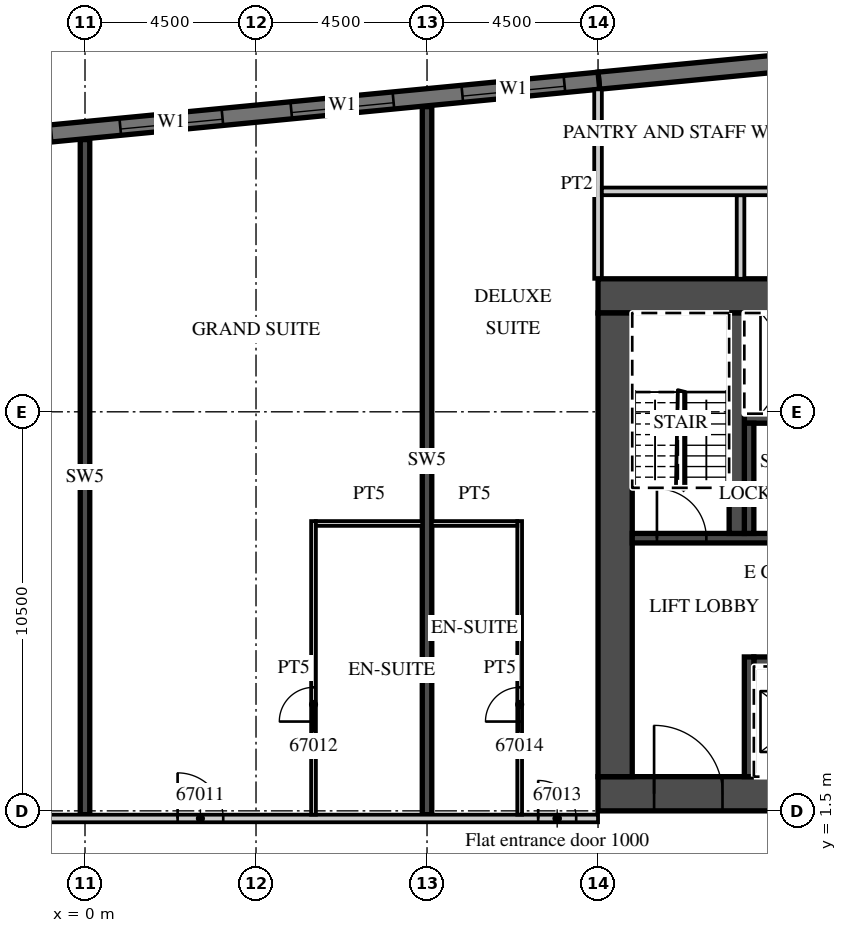
"""IFC4 building model, lengths in metres.
Left out: names, types, materials, properties, quantities, classifications, styles, units other than length and angle.
Written with IfcOpenShell. Run it as: python <this file> out.ifc"""

import sys

from ifc_helpers import new_model, si_unit, direction, frame, frame_2d, origin, place, context, subcontext, project, spatial, rectangle, extrude, element, fill, save


model = new_model("IFC4")
c1 = context("Model", 3, precision=1e-05, world=origin(), true_north=direction((0.0, 1.0)))
c2 = subcontext(c1, "Body", "Model", "MODEL_VIEW")
j1 = project(units=[si_unit("LENGTHUNIT", "METRE"), si_unit("PLANEANGLEUNIT", "RADIAN")], contexts=[c1])
p1 = place(None, origin())
s1 = spatial("IfcSite", under=j1, at=p1, CompositionType="ELEMENT")
p2 = place(p1, origin())
s2 = spatial("IfcBuilding", under=s1, at=p2, CompositionType="ELEMENT")
p3 = place(p2, frame((0.0, 0.0, 271.8)))
s3 = spatial("IfcBuildingStorey", under=s2, at=p3, CompositionType="ELEMENT", Elevation=271.8)
p4 = place(p3, frame((0.0, 1.4, 0.0), z_axis=(0.0, 0.0, 1.0), x_axis=(0.0, 1.0, 0.0)))
e1 = element("IfcWall", 1, at=p4, inside=s3, PredefinedType="SHEAR", context=c2, shape_type="SweptSolid", body=[
    extrude(rectangle(XDim=17.763, YDim=0.25, at=frame_2d((8.881, 0.0))), origin(), (0.0, 0.0, 1.0), 3.3),
])
p5 = place(p3, frame((9.0, 1.4, 0.0), z_axis=(0.0, 0.0, 1.0), x_axis=(0.0, 1.0, 0.0)))
e2 = element("IfcWall", 2, at=p5, inside=s3, PredefinedType="SHEAR", context=c2, shape_type="SweptSolid", body=[
    extrude(rectangle(XDim=18.629, YDim=0.25, at=frame_2d((9.315, 0.0))), origin(), (0.0, 0.0, 1.0), 3.3),
])
p6 = place(p3, frame((30.946, 22.391, 0.0), z_axis=(0.0, 0.0, 1.0), x_axis=(-0.995396397117, -0.095843688398, 0.0)))
e3 = element("IfcWall", 3, at=p6, inside=s3, PredefinedType="SOLIDWALL", context=c2, shape_type="SweptSolid", body=[
    extrude(rectangle(XDim=17.505, YDim=0.45, at=frame_2d((8.752, 0.0))), origin(), (0.0, 0.0, 1.0), 3.02),
])
p7 = place(p3, frame((13.521, 20.713, 0.0), z_axis=(0.0, 0.0, 1.0), x_axis=(-0.995396277313, -0.095844932638, 0.0)))
e4 = element("IfcWall", 4, at=p7, inside=s3, PredefinedType="SOLIDWALL", context=c2, shape_type="SweptSolid", body=[
    extrude(rectangle(XDim=51.495, YDim=0.45, at=frame_2d((25.748, 0.0))), origin(), (0.0, 0.0, 1.0), 3.02),
])
p8 = place(p7, frame((0.91, 0.0, 0.45)))
e5 = element("IfcOpeningElement", 5, at=p8, cuts=e4, PredefinedType="OPENING", context=c2, shape_type="SweptSolid", body=[
    extrude(rectangle(XDim=2.7, YDim=2.25, at=frame_2d((1.35, 1.125))), frame((0.0, 0.235, 0.0), z_axis=(0.0, -1.0, 0.0), x_axis=(1.0, 0.0, 0.0)), (0.0, 0.0, 1.0), 0.47),
])
p9 = place(p7, frame((5.431, 0.0, 0.45)))
e6 = element("IfcOpeningElement", 6, at=p9, cuts=e4, PredefinedType="OPENING", context=c2, shape_type="SweptSolid", body=[
    extrude(rectangle(XDim=2.7, YDim=2.25, at=frame_2d((1.35, 1.125))), frame((0.0, 0.235, 0.0), z_axis=(0.0, -1.0, 0.0), x_axis=(1.0, 0.0, 0.0)), (0.0, 0.0, 1.0), 0.47),
])
p10 = place(p7, frame((9.952, 0.0, 0.45)))
e7 = element("IfcOpeningElement", 7, at=p10, cuts=e4, PredefinedType="OPENING", context=c2, shape_type="SweptSolid", body=[
    extrude(rectangle(XDim=2.7, YDim=2.25, at=frame_2d((1.35, 1.125))), frame((0.0, 0.235, 0.0), z_axis=(0.0, -1.0, 0.0), x_axis=(1.0, 0.0, 0.0)), (0.0, 0.0, 1.0), 0.47),
])
p11 = place(p7, frame((14.473, 0.0, 0.45)))
e8 = element("IfcOpeningElement", 8, at=p11, cuts=e4, PredefinedType="OPENING", context=c2, shape_type="SweptSolid", body=[
    extrude(rectangle(XDim=2.7, YDim=2.25, at=frame_2d((1.35, 1.125))), frame((0.0, 0.235, 0.0), z_axis=(0.0, -1.0, 0.0), x_axis=(1.0, 0.0, 0.0)), (0.0, 0.0, 1.0), 0.47),
])
p12 = place(p7, frame((18.994, 0.0, 0.45)))
e9 = element("IfcOpeningElement", 9, at=p12, cuts=e4, PredefinedType="OPENING", context=c2, shape_type="SweptSolid", body=[
    extrude(rectangle(XDim=2.7, YDim=2.25, at=frame_2d((1.35, 1.125))), frame((0.0, 0.235, 0.0), z_axis=(0.0, -1.0, 0.0), x_axis=(1.0, 0.0, 0.0)), (0.0, 0.0, 1.0), 0.47),
])
p13 = place(p7, frame((23.514, 0.0, 0.45)))
e10 = element("IfcOpeningElement", 10, at=p13, cuts=e4, PredefinedType="OPENING", context=c2, shape_type="SweptSolid", body=[
    extrude(rectangle(XDim=2.7, YDim=2.25, at=frame_2d((1.35, 1.125))), frame((0.0, 0.235, 0.0), z_axis=(0.0, -1.0, 0.0), x_axis=(1.0, 0.0, 0.0)), (0.0, 0.0, 1.0), 0.47),
])
p14 = place(p7, frame((28.035, 0.0, 0.45)))
e11 = element("IfcOpeningElement", 11, at=p14, cuts=e4, PredefinedType="OPENING", context=c2, shape_type="SweptSolid", body=[
    extrude(rectangle(XDim=2.7, YDim=2.25, at=frame_2d((1.35, 1.125))), frame((0.0, 0.235, 0.0), z_axis=(0.0, -1.0, 0.0), x_axis=(1.0, 0.0, 0.0)), (0.0, 0.0, 1.0), 0.47),
])
p15 = place(p7, frame((32.556, 0.0, 0.45)))
e12 = element("IfcOpeningElement", 12, at=p15, cuts=e4, PredefinedType="OPENING", context=c2, shape_type="SweptSolid", body=[
    extrude(rectangle(XDim=2.7, YDim=2.25, at=frame_2d((1.35, 1.125))), frame((0.0, 0.235, 0.0), z_axis=(0.0, -1.0, 0.0), x_axis=(1.0, 0.0, 0.0)), (0.0, 0.0, 1.0), 0.47),
])
p16 = place(p7, frame((37.077, 0.0, 0.45)))
e13 = element("IfcOpeningElement", 13, at=p16, cuts=e4, PredefinedType="OPENING", context=c2, shape_type="SweptSolid", body=[
    extrude(rectangle(XDim=2.7, YDim=2.25, at=frame_2d((1.35, 1.125))), frame((0.0, 0.235, 0.0), z_axis=(0.0, -1.0, 0.0), x_axis=(1.0, 0.0, 0.0)), (0.0, 0.0, 1.0), 0.47),
])
p17 = place(p7, frame((41.598, 0.0, 0.45)))
e14 = element("IfcOpeningElement", 14, at=p17, cuts=e4, PredefinedType="OPENING", context=c2, shape_type="SweptSolid", body=[
    extrude(rectangle(XDim=2.7, YDim=2.25, at=frame_2d((1.35, 1.125))), frame((0.0, 0.235, 0.0), z_axis=(0.0, -1.0, 0.0), x_axis=(1.0, 0.0, 0.0)), (0.0, 0.0, 1.0), 0.47),
])
p18 = place(p7, frame((46.118, 0.0, 0.45)))
e15 = element("IfcOpeningElement", 15, at=p18, cuts=e4, PredefinedType="OPENING", context=c2, shape_type="SweptSolid", body=[
    extrude(rectangle(XDim=2.7, YDim=2.25, at=frame_2d((1.35, 1.125))), frame((0.0, 0.235, 0.0), z_axis=(0.0, -1.0, 0.0), x_axis=(1.0, 0.0, 0.0)), (0.0, 0.0, 1.0), 0.47),
])
p19 = place(p3, frame((13.5, 15.5, 0.0), z_axis=(0.0, 0.0, 1.0), x_axis=(0.0, 1.0, 0.0)))
e16 = element("IfcWall", 16, at=p19, inside=s3, PredefinedType="PARTITIONING", context=c2, shape_type="SweptSolid", body=[
    extrude(rectangle(XDim=4.985, YDim=0.2, at=frame_2d((2.493, 0.0))), origin(), (0.0, 0.0, 1.0), 3.02),
])
p20 = place(p3, frame((-39.909, 1.3, 0.0), z_axis=(0.0, 0.0, 1.0), x_axis=(1.0, 0.0, 0.0)))
e17 = element("IfcWall", 17, at=p20, inside=s3, PredefinedType="PARTITIONING", context=c2, shape_type="SweptSolid", body=[
    extrude(rectangle(XDim=53.409, YDim=0.2, at=frame_2d((26.705, 0.0))), origin(), (0.0, 0.0, 1.0), 3.02),
])
p21 = place(p20, frame((0.15, 0.0, 0.0)))
e18 = element("IfcOpeningElement", 18, at=p21, cuts=e17, PredefinedType="OPENING", context=c2, shape_type="SweptSolid", body=[
    extrude(rectangle(XDim=0.9, YDim=2.1, at=frame_2d((0.45, 1.05))), frame((0.0, 0.11, 0.0), z_axis=(0.0, -1.0, 0.0), x_axis=(1.0, 0.0, 0.0)), (0.0, 0.0, 1.0), 0.22),
])
p22 = place(p20, frame((9.271, 0.0, 0.0)))
e19 = element("IfcOpeningElement", 19, at=p22, cuts=e17, PredefinedType="OPENING", context=c2, shape_type="SweptSolid", body=[
    extrude(rectangle(XDim=1.2, YDim=2.1, at=frame_2d((0.6, 1.05))), frame((0.0, 0.11, 0.0), z_axis=(0.0, -1.0, 0.0), x_axis=(1.0, 0.0, 0.0)), (0.0, 0.0, 1.0), 0.22),
])
p23 = place(p20, frame((18.271, 0.0, 0.0)))
e20 = element("IfcOpeningElement", 20, at=p23, cuts=e17, PredefinedType="OPENING", context=c2, shape_type="SweptSolid", body=[
    extrude(rectangle(XDim=1.2, YDim=2.1, at=frame_2d((0.6, 1.05))), frame((0.0, 0.11, 0.0), z_axis=(0.0, -1.0, 0.0), x_axis=(1.0, 0.0, 0.0)), (0.0, 0.0, 1.0), 0.22),
])
p24 = place(p20, frame((27.271, 0.0, 0.0)))
e21 = element("IfcOpeningElement", 21, at=p24, cuts=e17, PredefinedType="OPENING", context=c2, shape_type="SweptSolid", body=[
    extrude(rectangle(XDim=1.2, YDim=2.1, at=frame_2d((0.6, 1.05))), frame((0.0, 0.11, 0.0), z_axis=(0.0, -1.0, 0.0), x_axis=(1.0, 0.0, 0.0)), (0.0, 0.0, 1.0), 0.22),
])
p25 = place(p20, frame((36.271, 0.0, 0.0)))
e22 = element("IfcOpeningElement", 22, at=p25, cuts=e17, PredefinedType="OPENING", context=c2, shape_type="SweptSolid", body=[
    extrude(rectangle(XDim=1.2, YDim=2.1, at=frame_2d((0.6, 1.05))), frame((0.0, 0.11, 0.0), z_axis=(0.0, -1.0, 0.0), x_axis=(1.0, 0.0, 0.0)), (0.0, 0.0, 1.0), 0.22),
])
p26 = place(p20, frame((42.346, 0.0, 0.0)))
e23 = element("IfcOpeningElement", 23, at=p26, cuts=e17, PredefinedType="OPENING", context=c2, shape_type="SweptSolid", body=[
    extrude(rectangle(XDim=1.2, YDim=2.1, at=frame_2d((0.6, 1.05))), frame((0.0, 0.11, 0.0), z_axis=(0.0, -1.0, 0.0), x_axis=(1.0, 0.0, 0.0)), (0.0, 0.0, 1.0), 0.22),
])
p27 = place(p20, frame((51.834, 0.0, 0.0)))
e24 = element("IfcOpeningElement", 24, at=p27, cuts=e17, PredefinedType="OPENING", context=c2, shape_type="SweptSolid", body=[
    extrude(rectangle(XDim=1.0, YDim=2.1, at=frame_2d((0.5, 1.05))), frame((0.0, 0.11, 0.0), z_axis=(0.0, -1.0, 0.0), x_axis=(1.0, 0.0, 0.0)), (0.0, 0.0, 1.0), 0.22),
])
p28 = place(p3, frame((6.013, 1.4, 0.0), z_axis=(0.0, 0.0, 1.0), x_axis=(0.0, 1.0, 0.0)))
e25 = element("IfcWall", 25, at=p28, inside=s3, PredefinedType="PARTITIONING", context=c2, shape_type="SweptSolid", body=[
    extrude(rectangle(XDim=7.725, YDim=0.125, at=frame_2d((3.863, 0.0))), origin(), (0.0, 0.0, 1.0), 3.02),
])
p29 = place(p28, frame((2.45, 0.0, 0.0)))
e26 = element("IfcOpeningElement", 26, at=p29, cuts=e25, PredefinedType="OPENING", context=c2, shape_type="SweptSolid", body=[
    extrude(rectangle(XDim=0.9, YDim=2.1, at=frame_2d((0.45, 1.05))), frame((0.0, 0.073, 0.0), z_axis=(0.0, -1.0, 0.0), x_axis=(1.0, 0.0, 0.0)), (0.0, 0.0, 1.0), 0.145),
])
p30 = place(p3, frame((6.075, 9.062, 0.0), z_axis=(0.0, 0.0, 1.0), x_axis=(1.0, 0.0, 0.0)))
e27 = element("IfcWall", 27, at=p30, inside=s3, PredefinedType="PARTITIONING", context=c2, shape_type="SweptSolid", body=[
    extrude(rectangle(XDim=2.8, YDim=0.125, at=frame_2d((1.4, 0.0))), origin(), (0.0, 0.0, 1.0), 3.02),
])
p31 = place(p3, frame((11.438, 1.4, 0.0), z_axis=(0.0, 0.0, 1.0), x_axis=(0.0, 1.0, 0.0)))
e28 = element("IfcWall", 28, at=p31, inside=s3, PredefinedType="PARTITIONING", context=c2, shape_type="SweptSolid", body=[
    extrude(rectangle(XDim=7.725, YDim=0.125, at=frame_2d((3.863, 0.0))), origin(), (0.0, 0.0, 1.0), 3.02),
])
p32 = place(p31, frame((2.45, 0.0, 0.0)))
e29 = element("IfcOpeningElement", 29, at=p32, cuts=e28, PredefinedType="OPENING", context=c2, shape_type="SweptSolid", body=[
    extrude(rectangle(XDim=0.9, YDim=2.1, at=frame_2d((0.45, 1.05))), frame((0.0, 0.073, 0.0), z_axis=(0.0, -1.0, 0.0), x_axis=(1.0, 0.0, 0.0)), (0.0, 0.0, 1.0), 0.145),
])
p33 = place(p3, frame((9.125, 9.062, 0.0), z_axis=(0.0, 0.0, 1.0), x_axis=(1.0, 0.0, 0.0)))
e30 = element("IfcWall", 30, at=p33, inside=s3, PredefinedType="PARTITIONING", context=c2, shape_type="SweptSolid", body=[
    extrude(rectangle(XDim=2.25, YDim=0.125, at=frame_2d((1.125, 0.0))), origin(), (0.0, 0.0, 1.0), 3.02),
])
p34 = place(p3, frame((13.5, 1.95, 0.0), z_axis=(0.0, 0.0, 1.0), x_axis=(1.0, 0.0, 0.0)))
e31 = element("IfcWall", 31, at=p34, inside=s3, PredefinedType="SHEAR", context=c2, shape_type="SweptSolid", body=[
    extrude(rectangle(XDim=18.0, YDim=0.9, at=frame_2d((9.0, 0.0))), origin(), (0.0, 0.0, 1.0), 3.02),
])
p35 = place(p34, frame((1.475, 0.0, 0.0)))
e32 = element("IfcOpeningElement", 32, at=p35, cuts=e31, PredefinedType="OPENING", context=c2, shape_type="SweptSolid", body=[
    extrude(rectangle(XDim=1.8, YDim=2.1, at=frame_2d((0.9, 1.05))), frame((0.0, 0.46, 0.0), z_axis=(0.0, -1.0, 0.0), x_axis=(1.0, 0.0, 0.0)), (0.0, 0.0, 1.0), 0.92),
])
p36 = place(p3, frame((13.5, 15.05, 0.0), z_axis=(0.0, 0.0, 1.0), x_axis=(1.0, 0.0, 0.0)))
e33 = element("IfcWall", 33, at=p36, inside=s3, PredefinedType="SHEAR", context=c2, shape_type="SweptSolid", body=[
    extrude(rectangle(XDim=6.8, YDim=0.9, at=frame_2d((3.4, 0.0))), origin(), (0.0, 0.0, 1.0), 3.02),
])
p37 = place(p36, frame((4.725, 0.0, 0.0)))
e34 = element("IfcOpeningElement", 34, at=p37, cuts=e33, PredefinedType="OPENING", context=c2, shape_type="SweptSolid", body=[
    extrude(rectangle(XDim=1.2, YDim=2.1, at=frame_2d((0.6, 1.05))), frame((0.0, 0.46, 0.0), z_axis=(0.0, -1.0, 0.0), x_axis=(1.0, 0.0, 0.0)), (0.0, 0.0, 1.0), 0.92),
])
p38 = place(p3, frame((13.95, 2.4, 0.0), z_axis=(0.0, 0.0, 1.0), x_axis=(0.0, 1.0, 0.0)))
e35 = element("IfcWall", 35, at=p38, inside=s3, PredefinedType="SHEAR", context=c2, shape_type="SweptSolid", body=[
    extrude(rectangle(XDim=12.2, YDim=0.9, at=frame_2d((6.1, 0.0))), origin(), (0.0, 0.0, 1.0), 3.02),
])
p39 = place(p3, frame((17.6, 5.425, 0.0), z_axis=(0.0, 0.0, 1.0), x_axis=(1.0, 0.0, 0.0)))
e36 = element("IfcWall", 36, at=p39, inside=s3, PredefinedType="SHEAR", context=c2, shape_type="SweptSolid", body=[
    extrude(rectangle(XDim=13.0, YDim=0.25, at=frame_2d((6.5, 0.0))), origin(), (0.0, 0.0, 1.0), 3.02),
])
p40 = place(p39, frame((3.275, 0.0, 0.0)))
e37 = element("IfcOpeningElement", 37, at=p40, cuts=e36, PredefinedType="OPENING", context=c2, shape_type="SweptSolid", body=[
    extrude(rectangle(XDim=1.2, YDim=2.1, at=frame_2d((0.6, 1.05))), frame((0.0, 0.135, 0.0), z_axis=(0.0, -1.0, 0.0), x_axis=(1.0, 0.0, 0.0)), (0.0, 0.0, 1.0), 0.27),
])
p41 = place(p39, frame((0.625, 0.0, 0.0)))
e38 = element("IfcOpeningElement", 38, at=p41, cuts=e36, PredefinedType="OPENING", context=c2, shape_type="SweptSolid", body=[
    extrude(rectangle(XDim=1.2, YDim=2.1, at=frame_2d((0.6, 1.05))), frame((0.0, 0.135, 0.0), z_axis=(0.0, -1.0, 0.0), x_axis=(1.0, 0.0, 0.0)), (0.0, 0.0, 1.0), 0.27),
])
p42 = place(p39, frame((7.275, 0.0, 0.0)))
e39 = element("IfcOpeningElement", 39, at=p42, cuts=e36, PredefinedType="OPENING", context=c2, shape_type="SweptSolid", body=[
    extrude(rectangle(XDim=1.0, YDim=2.1, at=frame_2d((0.5, 1.05))), frame((0.0, 0.135, 0.0), z_axis=(0.0, -1.0, 0.0), x_axis=(1.0, 0.0, 0.0)), (0.0, 0.0, 1.0), 0.27),
])
p43 = place(p3, frame((17.475, 2.4, 0.0), z_axis=(0.0, 0.0, 1.0), x_axis=(0.0, 1.0, 0.0)))
e40 = element("IfcWall", 40, at=p43, inside=s3, PredefinedType="SHEAR", context=c2, shape_type="SweptSolid", body=[
    extrude(rectangle(XDim=3.15, YDim=0.25, at=frame_2d((1.575, 0.0))), origin(), (0.0, 0.0, 1.0), 3.02),
])
p44 = place(p3, frame((14.4, 8.675, 0.0), z_axis=(0.0, 0.0, 1.0), x_axis=(1.0, 0.0, 0.0)))
e41 = element("IfcWall", 41, at=p44, inside=s3, PredefinedType="SHEAR", context=c2, shape_type="SweptSolid", body=[
    extrude(rectangle(XDim=16.2, YDim=0.25, at=frame_2d((8.1, 0.0))), origin(), (0.0, 0.0, 1.0), 3.02),
])
p45 = place(p44, frame((0.65, 0.0, 0.0)))
e42 = element("IfcOpeningElement", 42, at=p45, cuts=e41, PredefinedType="OPENING", context=c2, shape_type="SweptSolid", body=[
    extrude(rectangle(XDim=1.3, YDim=2.1, at=frame_2d((0.65, 1.05))), frame((0.0, 0.135, 0.0), z_axis=(0.0, -1.0, 0.0), x_axis=(1.0, 0.0, 0.0)), (0.0, 0.0, 1.0), 0.27),
])
p46 = place(p44, frame((13.262, 0.0, 0.0)))
e43 = element("IfcOpeningElement", 43, at=p46, cuts=e41, PredefinedType="OPENING", context=c2, shape_type="SweptSolid", body=[
    extrude(rectangle(XDim=1.0, YDim=2.1, at=frame_2d((0.5, 1.05))), frame((0.0, 0.135, 0.0), z_axis=(0.0, -1.0, 0.0), x_axis=(1.0, 0.0, 0.0)), (0.0, 0.0, 1.0), 0.27),
])
p47 = place(p44, frame((8.4, 0.0, 0.0)))
e44 = element("IfcOpeningElement", 44, at=p47, cuts=e41, PredefinedType="OPENING", context=c2, shape_type="SweptSolid", body=[
    extrude(rectangle(XDim=1.0, YDim=2.1, at=frame_2d((0.5, 1.05))), frame((0.0, 0.135, 0.0), z_axis=(0.0, -1.0, 0.0), x_axis=(1.0, 0.0, 0.0)), (0.0, 0.0, 1.0), 0.27),
])
p48 = place(p44, frame((4.212, 0.0, 0.0)))
e45 = element("IfcOpeningElement", 45, at=p48, cuts=e41, PredefinedType="OPENING", context=c2, shape_type="SweptSolid", body=[
    extrude(rectangle(XDim=1.0, YDim=2.1, at=frame_2d((0.5, 1.05))), frame((0.0, 0.135, 0.0), z_axis=(0.0, -1.0, 0.0), x_axis=(1.0, 0.0, 0.0)), (0.0, 0.0, 1.0), 0.27),
])
p49 = place(p3, frame((17.35, 11.825, 0.0), z_axis=(0.0, 0.0, 1.0), x_axis=(1.0, 0.0, 0.0)))
e46 = element("IfcWall", 46, at=p49, inside=s3, PredefinedType="SHEAR", context=c2, shape_type="SweptSolid", body=[
    extrude(rectangle(XDim=13.25, YDim=0.25, at=frame_2d((6.625, 0.0))), origin(), (0.0, 0.0, 1.0), 3.02),
])
p50 = place(p3, frame((17.475, 8.8, 0.0), z_axis=(0.0, 0.0, 1.0), x_axis=(0.0, 1.0, 0.0)))
e47 = element("IfcWall", 47, at=p50, inside=s3, PredefinedType="SHEAR", context=c2, shape_type="SweptSolid", body=[
    extrude(rectangle(XDim=2.9, YDim=0.25, at=frame_2d((1.45, 0.0))), origin(), (0.0, 0.0, 1.0), 3.02),
])
p51 = place(p3, frame((17.15, 8.8, 0.0), z_axis=(0.0, 0.0, 1.0), x_axis=(0.0, 1.0, 0.0)))
e48 = element("IfcWall", 48, at=p51, inside=s3, PredefinedType="SHEAR", context=c2, shape_type="SweptSolid", body=[
    extrude(rectangle(XDim=5.8, YDim=0.4, at=frame_2d((2.9, 0.0))), origin(), (0.0, 0.0, 1.0), 3.02),
])
p52 = place(p3, frame((17.25, 15.5, 0.0), z_axis=(0.0, 0.0, 1.0), x_axis=(0.0, 1.0, 0.0)))
e49 = element("IfcWall", 49, at=p52, inside=s3, PredefinedType="PARTITIONING", context=c2, shape_type="SweptSolid", body=[
    extrude(rectangle(XDim=2.2, YDim=0.2, at=frame_2d((1.1, 0.0))), origin(), (0.0, 0.0, 1.0), 3.02),
])
p53 = place(p3, frame((13.6, 17.8, 0.0), z_axis=(0.0, 0.0, 1.0), x_axis=(1.0, 0.0, 0.0)))
e50 = element("IfcWall", 50, at=p53, inside=s3, PredefinedType="PARTITIONING", context=c2, shape_type="SweptSolid", body=[
    extrude(rectangle(XDim=21.354, YDim=0.2, at=frame_2d((10.677, 0.0))), origin(), (0.0, 0.0, 1.0), 3.02),
])
p54 = place(p53, frame((15.012, 0.0, 0.0)))
e51 = element("IfcOpeningElement", 51, at=p54, cuts=e50, PredefinedType="OPENING", context=c2, shape_type="SweptSolid", body=[
    extrude(rectangle(XDim=0.9, YDim=2.1, at=frame_2d((0.45, 1.05))), frame((0.0, 0.11, 0.0), z_axis=(0.0, -1.0, 0.0), x_axis=(1.0, 0.0, 0.0)), (0.0, 0.0, 1.0), 0.22),
])
p55 = place(p53, frame((6.712, 0.0, 0.0)))
e52 = element("IfcOpeningElement", 52, at=p55, cuts=e50, PredefinedType="OPENING", context=c2, shape_type="SweptSolid", body=[
    extrude(rectangle(XDim=0.9, YDim=2.1, at=frame_2d((0.45, 1.05))), frame((0.0, 0.11, 0.0), z_axis=(0.0, -1.0, 0.0), x_axis=(1.0, 0.0, 0.0)), (0.0, 0.0, 1.0), 0.22),
])
p56 = place(p8, origin())
e53 = element("IfcWindow", 53, at=p56, inside=s3, PartitioningType="SINGLE_PANEL", PredefinedType="WINDOW", context=c2, shape_type="SweptSolid", body=[
    extrude(rectangle(XDim=2.7, YDim=2.25, at=frame_2d((1.35, 1.125))), frame((0.0, 0.09, 0.0), z_axis=(0.0, -1.0, 0.0), x_axis=(1.0, 0.0, 0.0)), (0.0, 0.0, 1.0), 0.06),
])
fill(e5, e53)
p57 = place(p9, origin())
e54 = element("IfcWindow", 54, at=p57, inside=s3, PartitioningType="SINGLE_PANEL", PredefinedType="WINDOW", context=c2, shape_type="SweptSolid", body=[
    extrude(rectangle(XDim=2.7, YDim=2.25, at=frame_2d((1.35, 1.125))), frame((0.0, 0.09, 0.0), z_axis=(0.0, -1.0, 0.0), x_axis=(1.0, 0.0, 0.0)), (0.0, 0.0, 1.0), 0.06),
])
fill(e6, e54)
p58 = place(p10, origin())
e55 = element("IfcWindow", 55, at=p58, inside=s3, PartitioningType="SINGLE_PANEL", PredefinedType="WINDOW", context=c2, shape_type="SweptSolid", body=[
    extrude(rectangle(XDim=2.7, YDim=2.25, at=frame_2d((1.35, 1.125))), frame((0.0, 0.09, 0.0), z_axis=(0.0, -1.0, 0.0), x_axis=(1.0, 0.0, 0.0)), (0.0, 0.0, 1.0), 0.06),
])
fill(e7, e55)
p59 = place(p26, origin())
e56 = element("IfcDoor", 56, at=p59, inside=s3, OperationType="SINGLE_SWING_LEFT", PredefinedType="DOOR", context=c2, shape_type="SweptSolid", body=[
    extrude(rectangle(XDim=1.2, YDim=2.1, at=frame_2d((0.6, 1.05))), frame((0.0, 0.025, 0.0), z_axis=(0.0, -1.0, 0.0), x_axis=(1.0, 0.0, 0.0)), (0.0, 0.0, 1.0), 0.05),
])
fill(e23, e56)
p60 = place(p29, origin())
e57 = element("IfcDoor", 57, at=p60, inside=s3, OperationType="SINGLE_SWING_LEFT", PredefinedType="DOOR", context=c2, shape_type="SweptSolid", body=[
    extrude(rectangle(XDim=0.9, YDim=2.1, at=frame_2d((0.45, 1.05))), frame((0.0, 0.025, 0.0), z_axis=(0.0, -1.0, 0.0), x_axis=(1.0, 0.0, 0.0)), (0.0, 0.0, 1.0), 0.05),
])
fill(e26, e57)
p61 = place(p27, origin())
e58 = element("IfcDoor", 58, at=p61, inside=s3, OperationType="SINGLE_SWING_LEFT", PredefinedType="DOOR", context=c2, shape_type="SweptSolid", body=[
    extrude(rectangle(XDim=1.0, YDim=2.1, at=frame_2d((0.5, 1.05))), frame((0.0, 0.025, 0.0), z_axis=(0.0, -1.0, 0.0), x_axis=(1.0, 0.0, 0.0)), (0.0, 0.0, 1.0), 0.05),
])
fill(e24, e58)
p62 = place(p32, origin())
e59 = element("IfcDoor", 59, at=p62, inside=s3, OperationType="SINGLE_SWING_LEFT", PredefinedType="DOOR", context=c2, shape_type="SweptSolid", body=[
    extrude(rectangle(XDim=0.9, YDim=2.1, at=frame_2d((0.45, 1.05))), frame((0.0, 0.025, 0.0), z_axis=(0.0, -1.0, 0.0), x_axis=(1.0, 0.0, 0.0)), (0.0, 0.0, 1.0), 0.05),
])
fill(e29, e59)
p63 = place(p35, origin())
e60 = element("IfcDoor", 60, at=p63, inside=s3, OperationType="DOUBLE_DOOR_DOUBLE_SWING", PredefinedType="DOOR", context=c2, shape_type="SweptSolid", body=[
    extrude(rectangle(XDim=1.8, YDim=2.1, at=frame_2d((0.9, 1.05))), frame((0.0, 0.025, 0.0), z_axis=(0.0, -1.0, 0.0), x_axis=(1.0, 0.0, 0.0)), (0.0, 0.0, 1.0), 0.05),
])
fill(e32, e60)
p64 = place(p45, origin())
e61 = element("IfcDoor", 61, at=p64, inside=s3, OperationType="SINGLE_SWING_LEFT", PredefinedType="DOOR", context=c2, shape_type="SweptSolid", body=[
    extrude(rectangle(XDim=1.3, YDim=2.1, at=frame_2d((0.65, 1.05))), frame((0.0, 0.025, 0.0), z_axis=(0.0, -1.0, 0.0), x_axis=(1.0, 0.0, 0.0)), (0.0, 0.0, 1.0), 0.05),
])
fill(e42, e61)
save(model, sys.argv[1])
